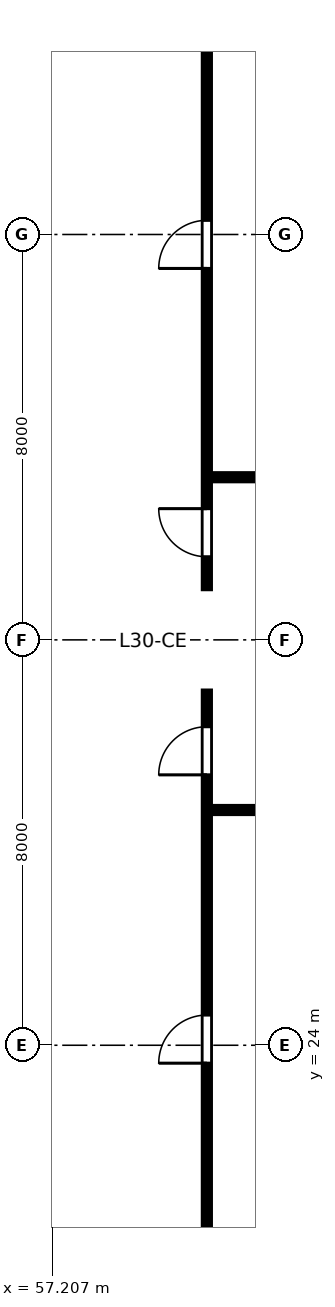
"""IFC4 building model, lengths in metres.
Left out: names, types, materials, properties, quantities, classifications, styles, units other than length and angle.
Written with IfcOpenShell. Run it as: python <this file> out.ifc"""

import sys

from ifc_helpers import new_model, si_unit, direction, frame, frame_2d, origin, place, context, subcontext, project, spatial, rectangle, extrude, element, fill, save


model = new_model("IFC4")
c1 = context("Model", 3, precision=1e-05, world=origin(), true_north=direction((0.0, 1.0)))
c2 = subcontext(c1, "Body", "Model", "MODEL_VIEW")
j1 = project(units=[si_unit("LENGTHUNIT", "METRE"), si_unit("PLANEANGLEUNIT", "RADIAN")], contexts=[c1])
p1 = place(None, origin())
s1 = spatial("IfcSite", under=j1, at=p1, CompositionType="ELEMENT")
p2 = place(p1, origin())
s2 = spatial("IfcBuilding", under=s1, at=p2, CompositionType="ELEMENT")
p3 = place(p2, frame((0.0, 0.0, 116.8)))
s3 = spatial("IfcBuildingStorey", under=s2, at=p3, CompositionType="ELEMENT", Elevation=116.8)
p4 = place(p3, frame((60.26, 28.643, 0.0), z_axis=(0.0, 0.0, 1.0), x_axis=(1.0, 0.0, 0.0)))
e1 = element("IfcWall", 1, at=p4, inside=s3, PredefinedType="PARTITIONING", context=c2, shape_type="SweptSolid", body=[
    extrude(rectangle(XDim=7.96, YDim=0.12, at=frame_2d((3.98, 0.0))), origin(), (0.0, 0.0, 1.0), 2.64),
])
p5 = place(p4, frame((1.4, 0.0, 0.0)))
e2 = element("IfcOpeningElement", 2, at=p5, cuts=e1, PredefinedType="OPENING", context=c2, shape_type="SweptSolid", body=[
    extrude(rectangle(XDim=0.9, YDim=2.15, at=frame_2d((0.45, 1.075))), frame((0.0, 0.07, 0.0), z_axis=(0.0, -1.0, 0.0), x_axis=(1.0, 0.0, 0.0)), (0.0, 0.0, 1.0), 0.14),
])
p6 = place(p3, frame((60.26, 35.209, 0.0), z_axis=(0.0, 0.0, 1.0), x_axis=(1.0, 0.0, 0.0)))
e3 = element("IfcWall", 3, at=p6, inside=s3, PredefinedType="PARTITIONING", context=c2, shape_type="SweptSolid", body=[
    extrude(rectangle(XDim=7.96, YDim=0.12, at=frame_2d((3.98, 0.0))), origin(), (0.0, 0.0, 1.0), 2.64),
])
p7 = place(p6, frame((1.4, 0.0, 0.0)))
e4 = element("IfcOpeningElement", 4, at=p7, cuts=e3, PredefinedType="OPENING", context=c2, shape_type="SweptSolid", body=[
    extrude(rectangle(XDim=0.9, YDim=2.15, at=frame_2d((0.45, 1.075))), frame((0.0, 0.07, 0.0), z_axis=(0.0, -1.0, 0.0), x_axis=(1.0, 0.0, 0.0)), (0.0, 0.0, 1.0), 0.14),
])
p8 = place(p3, frame((60.26, 19.4, 0.0), z_axis=(0.0, 0.0, 1.0), x_axis=(0.0, 1.0, 0.0)))
e5 = element("IfcWall", 5, at=p8, inside=s3, PredefinedType="PARTITIONING", context=c2, shape_type="SweptSolid", body=[
    extrude(rectangle(XDim=11.58, YDim=0.12, at=frame_2d((5.79, 0.0))), origin(), (0.0, 0.0, 1.0), 2.64),
])
p9 = place(p8, frame((4.246, 0.0, 0.0)))
e6 = element("IfcOpeningElement", 6, at=p9, cuts=e5, PredefinedType="OPENING", context=c2, shape_type="SweptSolid", body=[
    extrude(rectangle(XDim=0.95, YDim=2.15, at=frame_2d((0.475, 1.075))), frame((0.0, 0.07, 0.0), z_axis=(0.0, -1.0, 0.0), x_axis=(1.0, 0.0, 0.0)), (0.0, 0.0, 1.0), 0.14),
])
p10 = place(p8, frame((9.936, 0.0, 0.0)))
e7 = element("IfcOpeningElement", 7, at=p10, cuts=e5, PredefinedType="OPENING", context=c2, shape_type="SweptSolid", body=[
    extrude(rectangle(XDim=0.95, YDim=2.15, at=frame_2d((0.475, 1.075))), frame((0.0, 0.07, 0.0), z_axis=(0.0, -1.0, 0.0), x_axis=(1.0, 0.0, 0.0)), (0.0, 0.0, 1.0), 0.14),
])
p11 = place(p3, frame((60.26, 33.02, 0.0), z_axis=(0.0, 0.0, 1.0), x_axis=(0.0, 1.0, 0.0)))
e8 = element("IfcWall", 8, at=p11, inside=s3, PredefinedType="PARTITIONING", context=c2, shape_type="SweptSolid", body=[
    extrude(rectangle(XDim=11.58, YDim=0.12, at=frame_2d((5.79, 0.0))), origin(), (0.0, 0.0, 1.0), 2.64),
])
p12 = place(p11, frame((0.62, 0.0, 0.0)))
e9 = element("IfcOpeningElement", 9, at=p12, cuts=e8, PredefinedType="OPENING", context=c2, shape_type="SweptSolid", body=[
    extrude(rectangle(XDim=0.95, YDim=2.15, at=frame_2d((0.475, 1.075))), frame((0.0, 0.07, 0.0), z_axis=(0.0, -1.0, 0.0), x_axis=(1.0, 0.0, 0.0)), (0.0, 0.0, 1.0), 0.14),
])
p13 = place(p11, frame((6.31, 0.0, 0.0)))
e10 = element("IfcOpeningElement", 10, at=p13, cuts=e8, PredefinedType="OPENING", context=c2, shape_type="SweptSolid", body=[
    extrude(rectangle(XDim=0.95, YDim=2.15, at=frame_2d((0.475, 1.075))), frame((0.0, 0.07, 0.0), z_axis=(0.0, -1.0, 0.0), x_axis=(1.0, 0.0, 0.0)), (0.0, 0.0, 1.0), 0.14),
])
p14 = place(p9, origin())
e11 = element("IfcDoor", 11, at=p14, inside=s3, OperationType="SINGLE_SWING_LEFT", PredefinedType="DOOR", context=c2, shape_type="SweptSolid", body=[
    extrude(rectangle(XDim=0.95, YDim=2.15, at=frame_2d((0.475, 1.075))), frame((0.0, 0.025, 0.0), z_axis=(0.0, -1.0, 0.0), x_axis=(1.0, 0.0, 0.0)), (0.0, 0.0, 1.0), 0.05),
])
fill(e6, e11)
p15 = place(p10, origin())
e12 = element("IfcDoor", 12, at=p15, inside=s3, OperationType="SINGLE_SWING_LEFT", PredefinedType="DOOR", context=c2, shape_type="SweptSolid", body=[
    extrude(rectangle(XDim=0.95, YDim=2.15, at=frame_2d((0.475, 1.075))), frame((0.0, 0.025, 0.0), z_axis=(0.0, -1.0, 0.0), x_axis=(1.0, 0.0, 0.0)), (0.0, 0.0, 1.0), 0.05),
])
fill(e7, e12)
p16 = place(p12, origin())
e13 = element("IfcDoor", 13, at=p16, inside=s3, OperationType="SINGLE_SWING_RIGHT", PredefinedType="DOOR", context=c2, shape_type="SweptSolid", body=[
    extrude(rectangle(XDim=0.95, YDim=2.15, at=frame_2d((0.475, 1.075))), frame((0.0, 0.025, 0.0), z_axis=(0.0, -1.0, 0.0), x_axis=(1.0, 0.0, 0.0)), (0.0, 0.0, 1.0), 0.05),
])
fill(e9, e13)
p17 = place(p13, origin())
e14 = element("IfcDoor", 14, at=p17, inside=s3, OperationType="SINGLE_SWING_LEFT", PredefinedType="DOOR", context=c2, shape_type="SweptSolid", body=[
    extrude(rectangle(XDim=0.95, YDim=2.15, at=frame_2d((0.475, 1.075))), frame((0.0, 0.025, 0.0), z_axis=(0.0, -1.0, 0.0), x_axis=(1.0, 0.0, 0.0)), (0.0, 0.0, 1.0), 0.05),
])
fill(e10, e14)
save(model, sys.argv[1])
